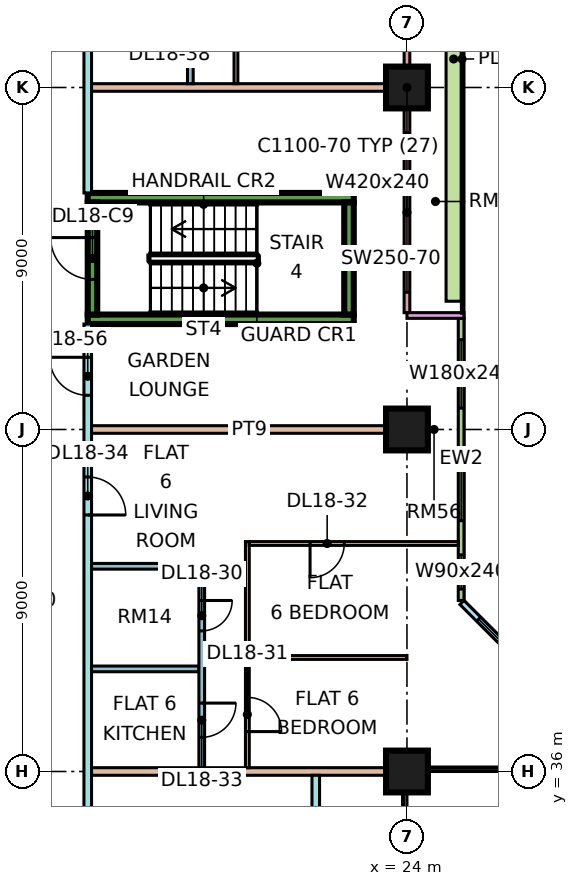
"""IFC4 building model, lengths in metres.
Left out: names, types, materials, properties, quantities, classifications, styles, units other than length and angle.
Written with IfcOpenShell. Run it as: python <this file> out.ifc"""

import sys

from ifc_helpers import new_model, si_unit, direction, frame, frame_2d, origin, origin_2d, place, context, subcontext, project, spatial, rectangle, extrude, element, fill, save


model = new_model("IFC4")
c1 = context("Model", 3, precision=1e-05, world=origin(), true_north=direction((0.0, 1.0)))
c2 = subcontext(c1, "Body", "Model", "MODEL_VIEW")
j1 = project(units=[si_unit("LENGTHUNIT", "METRE"), si_unit("PLANEANGLEUNIT", "RADIAN")], contexts=[c1])
p1 = place(None, origin())
s1 = spatial("IfcSite", under=j1, at=p1, CompositionType="ELEMENT")
p2 = place(p1, origin())
s2 = spatial("IfcBuilding", under=s1, at=p2, CompositionType="ELEMENT")
p3 = place(p2, frame((0.0, 0.0, 82.65)))
s3 = spatial("IfcBuildingStorey", under=s2, at=p3, CompositionType="ELEMENT", Elevation=82.65)
for number, where, z_axis, x_axis in (
    (1, (24.0, 36.0, 0.0), (0.0, 0.0, 1.0), (1.0, 0.0, 0.0)),
    (2, (24.0, 45.0, 0.0), (0.0, 0.0, 1.0), (1.0, 0.0, 0.0)),
    (3, (24.0, 54.0, 0.0), (0.0, 0.0, 1.0), (1.0, 0.0, 0.0)),
):
    element("IfcColumn", number, at=place(p3, frame(where, z_axis=z_axis, x_axis=x_axis)), inside=s3, PredefinedType="COLUMN", context=c2, shape_type="SweptSolid", body=[
        extrude(rectangle(XDim=1.1, YDim=1.1, at=origin_2d()), origin(), (0.0, 0.0, 1.0), 3.75),
    ])
for number, where, z_axis, x_axis in (
    (4, (15.6, 47.9, 0.0), (0.0, 0.0, 1.0), (1.0, 0.0, 0.0)),
    (5, (15.6, 51.1, 0.0), (0.0, 0.0, 1.0), (1.0, 0.0, 0.0)),
):
    element("IfcWall", number, at=place(p3, frame(where, z_axis=z_axis, x_axis=x_axis)), inside=s3, PredefinedType="SHEAR", context=c2, shape_type="SweptSolid", body=[
        extrude(rectangle(XDim=7.0, YDim=0.25, at=frame_2d((3.5, 0.0))), origin(), (0.0, 0.0, 1.0), 3.75),
    ])
p4 = place(p3, frame((15.725, 48.025, 0.0), z_axis=(0.0, 0.0, 1.0), x_axis=(0.0, 1.0, 0.0)))
e6 = element("IfcWall", 6, at=p4, inside=s3, PredefinedType="SHEAR", context=c2, shape_type="SweptSolid", body=[
    extrude(rectangle(XDim=2.95, YDim=0.25, at=frame_2d((1.475, 0.0))), origin(), (0.0, 0.0, 1.0), 3.75),
])
p5 = place(p4, frame((0.925, 0.0, 0.0)))
e7 = element("IfcOpeningElement", 7, at=p5, cuts=e6, PredefinedType="OPENING", context=c2, shape_type="SweptSolid", body=[
    extrude(rectangle(XDim=1.1, YDim=2.2, at=frame_2d((0.55, 1.1))), frame((0.0, 0.135, 0.0), z_axis=(0.0, -1.0, 0.0), x_axis=(1.0, 0.0, 0.0)), (0.0, 0.0, 1.0), 0.27),
])
p6 = place(p3, frame((22.475, 48.025, 0.0), z_axis=(0.0, 0.0, 1.0), x_axis=(0.0, 1.0, 0.0)))
e8 = element("IfcWall", 8, at=p6, inside=s3, PredefinedType="SHEAR", context=c2, shape_type="SweptSolid", body=[
    extrude(rectangle(XDim=2.95, YDim=0.25, at=frame_2d((1.475, 0.0))), origin(), (0.0, 0.0, 1.0), 3.75),
])
p7 = place(p3, frame((28.447, 37.447, 0.0), z_axis=(0.0, 0.0, 1.0), x_axis=(-0.707106781187, 0.707106781187, 0.0)))
e9 = element("IfcWall", 9, at=p7, inside=s3, PredefinedType="SOLIDWALL", context=c2, shape_type="SweptSolid", body=[
    extrude(rectangle(XDim=4.243, YDim=0.15, at=frame_2d((2.121, 0.0))), origin(), (0.0, 0.0, 1.0), 3.3),
])
p8 = place(p7, frame((0.621, 0.0, 0.45)))
e10 = element("IfcOpeningElement", 10, at=p8, cuts=e9, PredefinedType="OPENING", context=c2, shape_type="SweptSolid", body=[
    extrude(rectangle(XDim=3.0, YDim=2.4, at=frame_2d((1.5, 1.2))), frame((0.0, 0.085, 0.0), z_axis=(0.0, -1.0, 0.0), x_axis=(1.0, 0.0, 0.0)), (0.0, 0.0, 1.0), 0.17),
])
p9 = place(p3, frame((25.425, 40.5, 0.0), z_axis=(0.0, 0.0, 1.0), x_axis=(0.0, 1.0, 0.0)))
e11 = element("IfcWall", 11, at=p9, inside=s3, PredefinedType="SOLIDWALL", context=c2, shape_type="SweptSolid", body=[
    extrude(rectangle(XDim=7.425, YDim=0.15, at=frame_2d((3.712, 0.0))), origin(), (0.0, 0.0, 1.0), 3.3),
])
p10 = place(p9, frame((0.3, 0.0, 0.45)))
e12 = element("IfcOpeningElement", 12, at=p10, cuts=e11, PredefinedType="OPENING", context=c2, shape_type="SweptSolid", body=[
    extrude(rectangle(XDim=0.9, YDim=2.4, at=frame_2d((0.45, 1.2))), frame((0.0, 0.085, 0.0), z_axis=(0.0, -1.0, 0.0), x_axis=(1.0, 0.0, 0.0)), (0.0, 0.0, 1.0), 0.17),
])
p11 = place(p9, frame((2.1, 0.0, 0.45)))
e13 = element("IfcOpeningElement", 13, at=p11, cuts=e11, PredefinedType="OPENING", context=c2, shape_type="SweptSolid", body=[
    extrude(rectangle(XDim=1.8, YDim=2.4, at=frame_2d((0.9, 1.2))), frame((0.0, 0.085, 0.0), z_axis=(0.0, -1.0, 0.0), x_axis=(1.0, 0.0, 0.0)), (0.0, 0.0, 1.0), 0.17),
])
p12 = place(p9, frame((5.062, 0.0, 0.45)))
e14 = element("IfcOpeningElement", 14, at=p12, cuts=e11, PredefinedType="OPENING", context=c2, shape_type="SweptSolid", body=[
    extrude(rectangle(XDim=1.8, YDim=2.4, at=frame_2d((0.9, 1.2))), frame((0.0, 0.085, 0.0), z_axis=(0.0, -1.0, 0.0), x_axis=(1.0, 0.0, 0.0)), (0.0, 0.0, 1.0), 0.17),
])
p13 = place(p3, frame((24.0, 48.075, 0.0), z_axis=(0.0, 0.0, 1.0), x_axis=(0.0, 1.0, 0.0)))
e15 = element("IfcWall", 15, at=p13, inside=s3, PredefinedType="SOLIDWALL", context=c2, shape_type="SweptSolid", body=[
    extrude(rectangle(XDim=13.35, YDim=0.15, at=frame_2d((6.675, 0.0))), origin(), (0.0, 0.0, 1.0), 3.3),
])
p14 = place(p13, frame((0.538, 0.0, 0.45)))
e16 = element("IfcOpeningElement", 16, at=p14, cuts=e15, PredefinedType="OPENING", context=c2, shape_type="SweptSolid", body=[
    extrude(rectangle(XDim=4.2, YDim=2.4, at=frame_2d((2.1, 1.2))), frame((0.0, 0.085, 0.0), z_axis=(0.0, -1.0, 0.0), x_axis=(1.0, 0.0, 0.0)), (0.0, 0.0, 1.0), 0.17),
])
p15 = place(p13, frame((7.15, 0.0, 0.45)))
e17 = element("IfcOpeningElement", 17, at=p15, cuts=e15, PredefinedType="OPENING", context=c2, shape_type="SweptSolid", body=[
    extrude(rectangle(XDim=1.2, YDim=2.4, at=frame_2d((0.6, 1.2))), frame((0.0, 0.085, 0.0), z_axis=(0.0, -1.0, 0.0), x_axis=(1.0, 0.0, 0.0)), (0.0, 0.0, 1.0), 0.17),
])
p16 = place(p13, frame((9.525, 0.0, 0.0)))
e18 = element("IfcOpeningElement", 18, at=p16, cuts=e15, PredefinedType="OPENING", context=c2, shape_type="SweptSolid", body=[
    extrude(rectangle(XDim=1.8, YDim=2.4, at=frame_2d((0.9, 1.2))), frame((0.0, 0.085, 0.0), z_axis=(0.0, -1.0, 0.0), x_axis=(1.0, 0.0, 0.0)), (0.0, 0.0, 1.0), 0.17),
])
p17 = place(p3, frame((25.5, 48.0, 0.0), z_axis=(0.0, 0.0, 1.0), x_axis=(-1.0, 0.0, 0.0)))
e19 = element("IfcWall", 19, at=p17, inside=s3, PredefinedType="SOLIDWALL", context=c2, shape_type="SweptSolid", body=[
    extrude(rectangle(XDim=1.5, YDim=0.15, at=frame_2d((0.75, 0.0))), origin(), (0.0, 0.0, 1.0), 3.3),
])
p18 = place(p3, frame((25.229, 48.375, 0.0), z_axis=(0.0, 0.0, 1.0), x_axis=(0.0, 1.0, 0.0)))
e20 = element("IfcWall", 20, at=p18, inside=s3, PredefinedType="SOLIDWALL", context=c2, shape_type="SweptSolid", body=[
    extrude(rectangle(XDim=12.75, YDim=0.4, at=frame_2d((6.375, 0.0))), origin(), (0.0, 0.0, 1.0), 0.7),
])
p19 = place(p3, frame((15.6, 20.0, 0.0), z_axis=(0.0, 0.0, 1.0), x_axis=(0.0, 1.0, 0.0)))
e21 = element("IfcWall", 21, at=p19, inside=s3, PredefinedType="PARTITIONING", context=c2, shape_type="SweptSolid", body=[
    extrude(rectangle(XDim=27.775, YDim=0.2, at=frame_2d((13.887, 0.0))), origin(), (0.0, 0.0, 1.0), 3.3),
])
p20 = place(p19, frame((6.55, 0.0, 0.0)))
e22 = element("IfcOpeningElement", 22, at=p20, cuts=e21, PredefinedType="OPENING", context=c2, shape_type="SweptSolid", body=[
    extrude(rectangle(XDim=1.0, YDim=2.1, at=frame_2d((0.5, 1.05))), frame((0.0, 0.11, 0.0), z_axis=(0.0, -1.0, 0.0), x_axis=(1.0, 0.0, 0.0)), (0.0, 0.0, 1.0), 0.22),
])
p21 = place(p19, frame((12.25, 0.0, 0.0)))
e23 = element("IfcOpeningElement", 23, at=p21, cuts=e21, PredefinedType="OPENING", context=c2, shape_type="SweptSolid", body=[
    extrude(rectangle(XDim=1.6, YDim=2.1, at=frame_2d((0.8, 1.05))), frame((0.0, 0.11, 0.0), z_axis=(0.0, -1.0, 0.0), x_axis=(1.0, 0.0, 0.0)), (0.0, 0.0, 1.0), 0.22),
])
p22 = place(p19, frame((22.75, 0.0, 0.0)))
e24 = element("IfcOpeningElement", 24, at=p22, cuts=e21, PredefinedType="OPENING", context=c2, shape_type="SweptSolid", body=[
    extrude(rectangle(XDim=1.0, YDim=2.1, at=frame_2d((0.5, 1.05))), frame((0.0, 0.11, 0.0), z_axis=(0.0, -1.0, 0.0), x_axis=(1.0, 0.0, 0.0)), (0.0, 0.0, 1.0), 0.22),
])
p23 = place(p19, frame((1.15, 0.0, 0.0)))
e25 = element("IfcOpeningElement", 25, at=p23, cuts=e21, PredefinedType="OPENING", context=c2, shape_type="SweptSolid", body=[
    extrude(rectangle(XDim=1.8, YDim=2.1, at=frame_2d((0.9, 1.05))), frame((0.0, 0.11, 0.0), z_axis=(0.0, -1.0, 0.0), x_axis=(1.0, 0.0, 0.0)), (0.0, 0.0, 1.0), 0.22),
])
p24 = place(p19, frame((25.9, 0.0, 0.0)))
e26 = element("IfcOpeningElement", 26, at=p24, cuts=e21, PredefinedType="OPENING", context=c2, shape_type="SweptSolid", body=[
    extrude(rectangle(XDim=1.0, YDim=2.1, at=frame_2d((0.5, 1.05))), frame((0.0, 0.11, 0.0), z_axis=(0.0, -1.0, 0.0), x_axis=(1.0, 0.0, 0.0)), (0.0, 0.0, 1.0), 0.22),
])
p25 = place(p3, frame((15.6, 51.225, 0.0), z_axis=(0.0, 0.0, 1.0), x_axis=(0.0, 1.0, 0.0)))
e27 = element("IfcWall", 27, at=p25, inside=s3, PredefinedType="PARTITIONING", context=c2, shape_type="SweptSolid", body=[
    extrude(rectangle(XDim=13.125, YDim=0.2, at=frame_2d((6.562, 0.0))), origin(), (0.0, 0.0, 1.0), 3.3),
])
p26 = place(p25, frame((9.675, 0.0, 0.0)))
e28 = element("IfcOpeningElement", 28, at=p26, cuts=e27, PredefinedType="OPENING", context=c2, shape_type="SweptSolid", body=[
    extrude(rectangle(XDim=1.0, YDim=2.1, at=frame_2d((0.5, 1.05))), frame((0.0, 0.11, 0.0), z_axis=(0.0, -1.0, 0.0), x_axis=(1.0, 0.0, 0.0)), (0.0, 0.0, 1.0), 0.22),
])
p27 = place(p3, frame((15.7, 36.0, 0.0), z_axis=(0.0, 0.0, 1.0), x_axis=(1.0, 0.0, 0.0)))
e29 = element("IfcWall", 29, at=p27, inside=s3, PredefinedType="PARTITIONING", context=c2, shape_type="SweptSolid", body=[
    extrude(rectangle(XDim=8.3, YDim=0.2, at=frame_2d((4.15, 0.0))), origin(), (0.0, 0.0, 1.0), 3.3),
])
for number, where, z_axis, x_axis in (
    (30, (15.7, 38.7, 0.0), (0.0, 0.0, 1.0), (1.0, 0.0, 0.0)),
    (31, (15.7, 41.4, 0.0), (0.0, 0.0, 1.0), (1.0, 0.0, 0.0)),
):
    element("IfcWall", number, at=place(p3, frame(where, z_axis=z_axis, x_axis=x_axis)), inside=s3, PredefinedType="PARTITIONING", context=c2, shape_type="SweptSolid", body=[
        extrude(rectangle(XDim=2.825, YDim=0.15, at=frame_2d((1.413, 0.0))), origin(), (0.0, 0.0, 1.0), 3.3),
    ])
p28 = place(p3, frame((15.7, 45.0, 0.0), z_axis=(0.0, 0.0, 1.0), x_axis=(1.0, 0.0, 0.0)))
e32 = element("IfcWall", 32, at=p28, inside=s3, PredefinedType="PARTITIONING", context=c2, shape_type="SweptSolid", body=[
    extrude(rectangle(XDim=8.3, YDim=0.2, at=frame_2d((4.15, 0.0))), origin(), (0.0, 0.0, 1.0), 3.3),
])
p29 = place(p3, frame((15.7, 54.0, 0.0), z_axis=(0.0, 0.0, 1.0), x_axis=(1.0, 0.0, 0.0)))
e33 = element("IfcWall", 33, at=p29, inside=s3, PredefinedType="PARTITIONING", context=c2, shape_type="SweptSolid", body=[
    extrude(rectangle(XDim=8.226, YDim=0.2, at=frame_2d((4.113, 0.0))), origin(), (0.0, 0.0, 1.0), 3.3),
])
p30 = place(p3, frame((18.3, 54.1, 0.0), z_axis=(0.0, 0.0, 1.0), x_axis=(0.0, 1.0, 0.0)))
e34 = element("IfcWall", 34, at=p30, inside=s3, PredefinedType="PARTITIONING", context=c2, shape_type="SweptSolid", body=[
    extrude(rectangle(XDim=5.675, YDim=0.15, at=frame_2d((2.837, 0.0))), origin(), (0.0, 0.0, 1.0), 3.3),
])
p31 = place(p30, frame((1.25, 0.0, 0.0)))
e35 = element("IfcOpeningElement", 35, at=p31, cuts=e34, PredefinedType="OPENING", context=c2, shape_type="SweptSolid", body=[
    extrude(rectangle(XDim=0.9, YDim=2.1, at=frame_2d((0.45, 1.05))), frame((0.0, 0.085, 0.0), z_axis=(0.0, -1.0, 0.0), x_axis=(1.0, 0.0, 0.0)), (0.0, 0.0, 1.0), 0.17),
])
p32 = place(p3, frame((18.6, 36.1, 0.0), z_axis=(0.0, 0.0, 1.0), x_axis=(0.0, 1.0, 0.0)))
e36 = element("IfcWall", 36, at=p32, inside=s3, PredefinedType="PARTITIONING", context=c2, shape_type="SweptSolid", body=[
    extrude(rectangle(XDim=5.375, YDim=0.15, at=frame_2d((2.688, 0.0))), origin(), (0.0, 0.0, 1.0), 3.3),
])
p33 = place(p32, frame((3.6, 0.0, 0.0)))
e37 = element("IfcOpeningElement", 37, at=p33, cuts=e36, PredefinedType="OPENING", context=c2, shape_type="SweptSolid", body=[
    extrude(rectangle(XDim=0.8, YDim=2.1, at=frame_2d((0.4, 1.05))), frame((0.0, 0.085, 0.0), z_axis=(0.0, -1.0, 0.0), x_axis=(1.0, 0.0, 0.0)), (0.0, 0.0, 1.0), 0.17),
])
p34 = place(p32, frame((0.8, 0.0, 0.0)))
e38 = element("IfcOpeningElement", 38, at=p34, cuts=e36, PredefinedType="OPENING", context=c2, shape_type="SweptSolid", body=[
    extrude(rectangle(XDim=0.9, YDim=2.1, at=frame_2d((0.45, 1.05))), frame((0.0, 0.085, 0.0), z_axis=(0.0, -1.0, 0.0), x_axis=(1.0, 0.0, 0.0)), (0.0, 0.0, 1.0), 0.17),
])
p35 = place(p3, frame((19.5, 54.1, 0.0), z_axis=(0.0, 0.0, 1.0), x_axis=(0.0, 1.0, 0.0)))
e39 = element("IfcWall", 39, at=p35, inside=s3, PredefinedType="PARTITIONING", context=c2, shape_type="SweptSolid", body=[
    extrude(rectangle(XDim=5.95, YDim=0.1, at=frame_2d((2.975, 0.0))), origin(), (0.0, 0.0, 1.0), 3.3),
])
p36 = place(p35, frame((0.95, 0.0, 0.0)))
e40 = element("IfcOpeningElement", 40, at=p36, cuts=e39, PredefinedType="OPENING", context=c2, shape_type="SweptSolid", body=[
    extrude(rectangle(XDim=0.9, YDim=2.1, at=frame_2d((0.45, 1.05))), frame((0.0, 0.06, 0.0), z_axis=(0.0, -1.0, 0.0), x_axis=(1.0, 0.0, 0.0)), (0.0, 0.0, 1.0), 0.12),
])
p37 = place(p35, frame((3.95, 0.0, 0.0)))
e41 = element("IfcOpeningElement", 41, at=p37, cuts=e39, PredefinedType="OPENING", context=c2, shape_type="SweptSolid", body=[
    extrude(rectangle(XDim=0.9, YDim=2.1, at=frame_2d((0.45, 1.05))), frame((0.0, 0.06, 0.0), z_axis=(0.0, -1.0, 0.0), x_axis=(1.0, 0.0, 0.0)), (0.0, 0.0, 1.0), 0.12),
])
p38 = place(p3, frame((19.8, 36.1, 0.0), z_axis=(0.0, 0.0, 1.0), x_axis=(0.0, 1.0, 0.0)))
e42 = element("IfcWall", 42, at=p38, inside=s3, PredefinedType="PARTITIONING", context=c2, shape_type="SweptSolid", body=[
    extrude(rectangle(XDim=5.95, YDim=0.1, at=frame_2d((2.975, 0.0))), origin(), (0.0, 0.0, 1.0), 3.3),
])
p39 = place(p38, frame((0.95, 0.0, 0.0)))
e43 = element("IfcOpeningElement", 43, at=p39, cuts=e42, PredefinedType="OPENING", context=c2, shape_type="SweptSolid", body=[
    extrude(rectangle(XDim=0.9, YDim=2.1, at=frame_2d((0.45, 1.05))), frame((0.0, 0.06, 0.0), z_axis=(0.0, -1.0, 0.0), x_axis=(1.0, 0.0, 0.0)), (0.0, 0.0, 1.0), 0.12),
])
p40 = place(p3, frame((19.85, 39.0, 0.0), z_axis=(0.0, 0.0, 1.0), x_axis=(1.0, 0.0, 0.0)))
e44 = element("IfcWall", 44, at=p40, inside=s3, PredefinedType="PARTITIONING", context=c2, shape_type="SweptSolid", body=[
    extrude(rectangle(XDim=4.15, YDim=0.1, at=frame_2d((2.075, 0.0))), origin(), (0.0, 0.0, 1.0), 3.3),
])
p41 = place(p3, frame((19.85, 42.0, 0.0), z_axis=(0.0, 0.0, 1.0), x_axis=(1.0, 0.0, 0.0)))
e45 = element("IfcWall", 45, at=p41, inside=s3, PredefinedType="PARTITIONING", context=c2, shape_type="SweptSolid", body=[
    extrude(rectangle(XDim=5.5, YDim=0.1, at=frame_2d((2.75, 0.0))), origin(), (0.0, 0.0, 1.0), 3.3),
])
p42 = place(p41, frame((1.6, 0.0, 0.0)))
e46 = element("IfcOpeningElement", 46, at=p42, cuts=e45, PredefinedType="OPENING", context=c2, shape_type="SweptSolid", body=[
    extrude(rectangle(XDim=0.9, YDim=2.1, at=frame_2d((0.45, 1.05))), frame((0.0, 0.06, 0.0), z_axis=(0.0, -1.0, 0.0), x_axis=(1.0, 0.0, 0.0)), (0.0, 0.0, 1.0), 0.12),
])
p43 = place(p3, frame((21.6, 23.9, 0.0), z_axis=(0.0, 0.0, 1.0), x_axis=(0.0, 1.0, 0.0)))
e47 = element("IfcWall", 47, at=p43, inside=s3, PredefinedType="PARTITIONING", context=c2, shape_type="SweptSolid", body=[
    extrude(rectangle(XDim=12.0, YDim=0.2, at=frame_2d((6.0, 0.0))), origin(), (0.0, 0.0, 1.0), 3.3),
])
p44 = place(p8, origin())
e48 = element("IfcWindow", 48, at=p44, inside=s3, PartitioningType="SINGLE_PANEL", PredefinedType="WINDOW", context=c2, shape_type="SweptSolid", body=[
    extrude(rectangle(XDim=3.0, YDim=2.4, at=frame_2d((1.5, 1.2))), frame((0.0, 0.03, 0.0), z_axis=(0.0, -1.0, 0.0), x_axis=(1.0, 0.0, 0.0)), (0.0, 0.0, 1.0), 0.06),
])
fill(e10, e48)
p45 = place(p10, origin())
e49 = element("IfcWindow", 49, at=p45, inside=s3, PartitioningType="SINGLE_PANEL", PredefinedType="WINDOW", context=c2, shape_type="SweptSolid", body=[
    extrude(rectangle(XDim=0.9, YDim=2.4, at=frame_2d((0.45, 1.2))), frame((0.0, 0.03, 0.0), z_axis=(0.0, -1.0, 0.0), x_axis=(1.0, 0.0, 0.0)), (0.0, 0.0, 1.0), 0.06),
])
fill(e12, e49)
p46 = place(p11, origin())
e50 = element("IfcWindow", 50, at=p46, inside=s3, PartitioningType="SINGLE_PANEL", PredefinedType="WINDOW", context=c2, shape_type="SweptSolid", body=[
    extrude(rectangle(XDim=1.8, YDim=2.4, at=frame_2d((0.9, 1.2))), frame((0.0, 0.03, 0.0), z_axis=(0.0, -1.0, 0.0), x_axis=(1.0, 0.0, 0.0)), (0.0, 0.0, 1.0), 0.06),
])
fill(e13, e50)
p47 = place(p12, origin())
e51 = element("IfcWindow", 51, at=p47, inside=s3, PartitioningType="SINGLE_PANEL", PredefinedType="WINDOW", context=c2, shape_type="SweptSolid", body=[
    extrude(rectangle(XDim=1.8, YDim=2.4, at=frame_2d((0.9, 1.2))), frame((0.0, 0.03, 0.0), z_axis=(0.0, -1.0, 0.0), x_axis=(1.0, 0.0, 0.0)), (0.0, 0.0, 1.0), 0.06),
])
fill(e14, e51)
p48 = place(p14, origin())
e52 = element("IfcWindow", 52, at=p48, inside=s3, PartitioningType="SINGLE_PANEL", PredefinedType="WINDOW", context=c2, shape_type="SweptSolid", body=[
    extrude(rectangle(XDim=4.2, YDim=2.4, at=frame_2d((2.1, 1.2))), frame((0.0, 0.03, 0.0), z_axis=(0.0, -1.0, 0.0), x_axis=(1.0, 0.0, 0.0)), (0.0, 0.0, 1.0), 0.06),
])
fill(e16, e52)
p49 = place(p5, frame((1.1, 0.0, 0.0), z_axis=(0.0, 0.0, 1.0), x_axis=(-1.0, 0.0, 0.0)))
e53 = element("IfcDoor", 53, at=p49, inside=s3, OperationType="SINGLE_SWING_RIGHT", PredefinedType="DOOR", context=c2, shape_type="SweptSolid", body=[
    extrude(rectangle(XDim=1.1, YDim=2.2, at=frame_2d((0.55, 1.1))), frame((0.0, 0.025, 0.0), z_axis=(0.0, -1.0, 0.0), x_axis=(1.0, 0.0, 0.0)), (0.0, 0.0, 1.0), 0.05),
])
fill(e7, e53)
p50 = place(p33, origin())
e54 = element("IfcDoor", 54, at=p50, inside=s3, OperationType="SINGLE_SWING_RIGHT", PredefinedType="DOOR", context=c2, shape_type="SweptSolid", body=[
    extrude(rectangle(XDim=0.8, YDim=2.1, at=frame_2d((0.4, 1.05))), frame((0.0, 0.025, 0.0), z_axis=(0.0, -1.0, 0.0), x_axis=(1.0, 0.0, 0.0)), (0.0, 0.0, 1.0), 0.05),
])
fill(e37, e54)
p51 = place(p39, frame((0.9, 0.0, 0.0), z_axis=(0.0, 0.0, 1.0), x_axis=(-1.0, 0.0, 0.0)))
e55 = element("IfcDoor", 55, at=p51, inside=s3, OperationType="SINGLE_SWING_LEFT", PredefinedType="DOOR", context=c2, shape_type="SweptSolid", body=[
    extrude(rectangle(XDim=0.9, YDim=2.1, at=frame_2d((0.45, 1.05))), frame((0.0, 0.025, 0.0), z_axis=(0.0, -1.0, 0.0), x_axis=(1.0, 0.0, 0.0)), (0.0, 0.0, 1.0), 0.05),
])
fill(e43, e55)
p52 = place(p42, frame((0.9, 0.0, 0.0), z_axis=(0.0, 0.0, 1.0), x_axis=(-1.0, 0.0, 0.0)))
e56 = element("IfcDoor", 56, at=p52, inside=s3, OperationType="SINGLE_SWING_LEFT", PredefinedType="DOOR", context=c2, shape_type="SweptSolid", body=[
    extrude(rectangle(XDim=0.9, YDim=2.1, at=frame_2d((0.45, 1.05))), frame((0.0, 0.025, 0.0), z_axis=(0.0, -1.0, 0.0), x_axis=(1.0, 0.0, 0.0)), (0.0, 0.0, 1.0), 0.05),
])
fill(e46, e56)
p53 = place(p34, origin())
e57 = element("IfcDoor", 57, at=p53, inside=s3, OperationType="SINGLE_SWING_RIGHT", PredefinedType="DOOR", context=c2, shape_type="SweptSolid", body=[
    extrude(rectangle(XDim=0.9, YDim=2.1, at=frame_2d((0.45, 1.05))), frame((0.0, 0.025, 0.0), z_axis=(0.0, -1.0, 0.0), x_axis=(1.0, 0.0, 0.0)), (0.0, 0.0, 1.0), 0.05),
])
fill(e38, e57)
p54 = place(p22, frame((1.0, 0.0, 0.0), z_axis=(0.0, 0.0, 1.0), x_axis=(-1.0, 0.0, 0.0)))
e58 = element("IfcDoor", 58, at=p54, inside=s3, OperationType="SINGLE_SWING_LEFT", PredefinedType="DOOR", context=c2, shape_type="SweptSolid", body=[
    extrude(rectangle(XDim=1.0, YDim=2.1, at=frame_2d((0.5, 1.05))), frame((0.0, 0.025, 0.0), z_axis=(0.0, -1.0, 0.0), x_axis=(1.0, 0.0, 0.0)), (0.0, 0.0, 1.0), 0.05),
])
fill(e24, e58)
p55 = place(p24, frame((1.0, 0.0, 0.0), z_axis=(0.0, 0.0, 1.0), x_axis=(-1.0, 0.0, 0.0)))
e59 = element("IfcDoor", 59, at=p55, inside=s3, OperationType="SINGLE_SWING_RIGHT", PredefinedType="DOOR", context=c2, shape_type="SweptSolid", body=[
    extrude(rectangle(XDim=1.0, YDim=2.1, at=frame_2d((0.5, 1.05))), frame((0.0, 0.025, 0.0), z_axis=(0.0, -1.0, 0.0), x_axis=(1.0, 0.0, 0.0)), (0.0, 0.0, 1.0), 0.05),
])
fill(e26, e59)
save(model, sys.argv[1])
